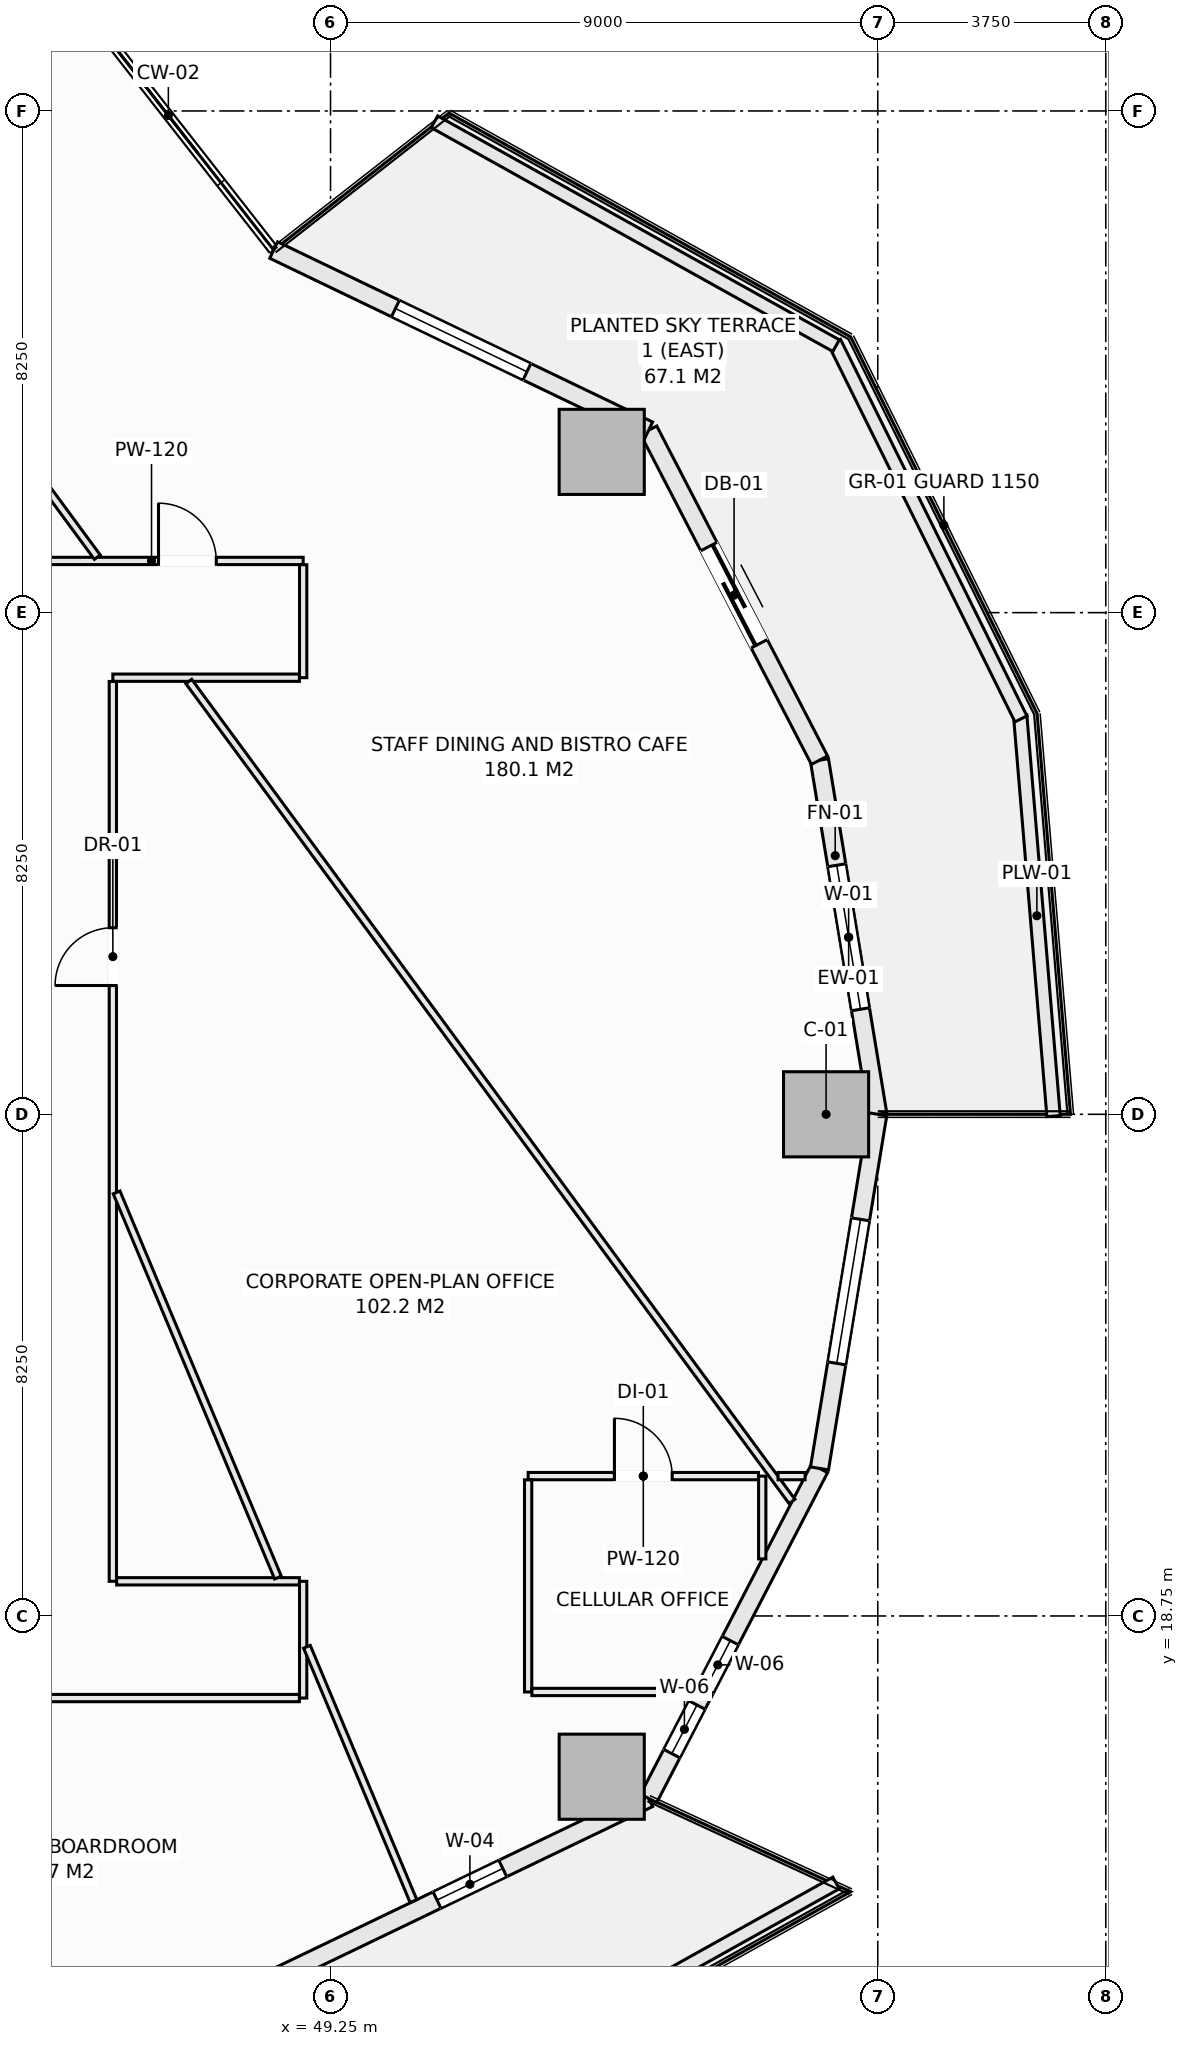
"""IFC4 building model, lengths in metres.
Left out: names, types, materials, properties, quantities, classifications, styles, units other than length and angle.
Written with IfcOpenShell. Run it as: python <this file> out.ifc"""

import sys

from ifc_helpers import new_model, si_unit, direction, frame, frame_2d, origin, origin_2d, place, context, subcontext, project, spatial, rectangle, extrude, element, fill, save


model = new_model("IFC4")
c1 = context("Model", 3, precision=1e-05, world=origin(), true_north=direction((0.0, 1.0)))
c2 = subcontext(c1, "Body", "Model", "MODEL_VIEW")
j1 = project(units=[si_unit("LENGTHUNIT", "METRE"), si_unit("PLANEANGLEUNIT", "RADIAN")], contexts=[c1])
p1 = place(None, origin())
s1 = spatial("IfcSite", under=j1, at=p1, CompositionType="ELEMENT")
p2 = place(p1, origin())
s2 = spatial("IfcBuilding", under=s1, at=p2, CompositionType="ELEMENT")
p3 = place(p2, frame((0.0, 0.0, 30.35)))
s3 = spatial("IfcBuildingStorey", under=s2, at=p3, CompositionType="ELEMENT", Elevation=30.35)
for number, where, z_axis, x_axis in (
    (1, (57.4, 27.0, -0.28), (0.0, 0.0, 1.0), (1.0, 0.0, 0.0)),
    (2, (53.71, 37.894, -0.28), (0.0, 0.0, 1.0), (1.0, 0.0, 0.0)),
    (3, (53.71, 16.106, -0.28), (0.0, 0.0, 1.0), (1.0, 0.0, 0.0)),
):
    element("IfcColumn", number, at=place(p3, frame(where, z_axis=z_axis, x_axis=x_axis)), inside=s3, PredefinedType="COLUMN", context=c2, shape_type="SweptSolid", body=[
        extrude(rectangle(XDim=1.4, YDim=1.4, at=origin_2d()), origin(), (0.0, 0.0, 1.0), 3.85),
    ])
p4 = place(p3, frame((57.292, 32.823, 0.0), z_axis=(0.0, 0.0, 1.0), x_axis=(0.162366057843, -0.98673059305, 0.0)))
e4 = element("IfcWall", 4, at=p4, inside=s3, PredefinedType="SOLIDWALL", context=c2, shape_type="SweptSolid", body=[
    extrude(rectangle(XDim=5.902, YDim=0.3, at=frame_2d((2.951, 0.0))), origin(), (0.0, 0.0, 1.0), 3.093),
])
p5 = place(p4, frame((1.751, 0.0, 0.85)))
e5 = element("IfcOpeningElement", 5, at=p5, cuts=e4, PredefinedType="OPENING", context=c2, shape_type="SweptSolid", body=[
    extrude(rectangle(XDim=2.4, YDim=1.9, at=frame_2d((1.2, 0.95))), frame((0.0, 0.16, 0.0), z_axis=(0.0, -1.0, 0.0), x_axis=(1.0, 0.0, 0.0)), (0.0, 0.0, 1.0), 0.32),
])
p6 = place(p3, frame((54.482, 38.25, 0.0), z_axis=(0.0, 0.0, 1.0), x_axis=(0.459809804413, -0.88801742312, 0.0)))
e6 = element("IfcWall", 6, at=p6, inside=s3, PredefinedType="SOLIDWALL", context=c2, shape_type="SweptSolid", body=[
    extrude(rectangle(XDim=6.111, YDim=0.3, at=frame_2d((3.055, 0.0))), origin(), (0.0, 0.0, 1.0), 3.093),
])
p7 = place(p6, frame((2.155, 0.0, 0.0)))
e7 = element("IfcOpeningElement", 7, at=p7, cuts=e6, PredefinedType="OPENING", context=c2, shape_type="SweptSolid", body=[
    extrude(rectangle(XDim=1.8, YDim=2.25, at=frame_2d((0.9, 1.125))), frame((0.0, 0.16, 0.0), z_axis=(0.0, -1.0, 0.0), x_axis=(1.0, 0.0, 0.0)), (0.0, 0.0, 1.0), 0.32),
])
p8 = place(p3, frame((48.315, 41.213, 0.0), z_axis=(0.0, 0.0, 1.0), x_axis=(0.901360393999, -0.433069786673, 0.0)))
e8 = element("IfcWall", 8, at=p8, inside=s3, PredefinedType="SOLIDWALL", context=c2, shape_type="SweptSolid", body=[
    extrude(rectangle(XDim=6.842, YDim=0.3, at=frame_2d((3.421, 0.0))), origin(), (0.0, 0.0, 1.0), 3.093),
])
p9 = place(p8, frame((2.221, 0.0, 0.85)))
e9 = element("IfcOpeningElement", 9, at=p9, cuts=e8, PredefinedType="OPENING", context=c2, shape_type="SweptSolid", body=[
    extrude(rectangle(XDim=2.4, YDim=1.9, at=frame_2d((1.2, 0.95))), frame((0.0, 0.16, 0.0), z_axis=(0.0, -1.0, 0.0), x_axis=(1.0, 0.0, 0.0)), (0.0, 0.0, 1.0), 0.32),
])
p10 = place(p3, frame((48.315, 12.787, 0.0), z_axis=(0.0, 0.0, 1.0), x_axis=(0.901360393999, 0.433069786673, 0.0)))
e10 = element("IfcWall", 10, at=p10, inside=s3, PredefinedType="SOLIDWALL", context=c2, shape_type="SweptSolid", body=[
    extrude(rectangle(XDim=6.842, YDim=0.3, at=frame_2d((3.421, 0.0))), origin(), (0.0, 0.0, 1.0), 3.093),
])
p11 = place(p10, frame((2.98, 0.0, 0.72)))
e11 = element("IfcOpeningElement", 11, at=p11, cuts=e10, PredefinedType="OPENING", context=c2, shape_type="SweptSolid", body=[
    extrude(rectangle(XDim=1.2, YDim=1.65, at=frame_2d((0.6, 0.825))), frame((0.0, 0.16, 0.0), z_axis=(0.0, -1.0, 0.0), x_axis=(1.0, 0.0, 0.0)), (0.0, 0.0, 1.0), 0.32),
])
p12 = place(p3, frame((54.482, 15.75, 0.0), z_axis=(0.0, 0.0, 1.0), x_axis=(0.459809804413, 0.88801742312, 0.0)))
e12 = element("IfcWall", 12, at=p12, inside=s3, PredefinedType="SOLIDWALL", context=c2, shape_type="SweptSolid", body=[
    extrude(rectangle(XDim=6.111, YDim=0.3, at=frame_2d((3.055, 0.0))), origin(), (0.0, 0.0, 1.0), 3.093),
])
p13 = place(p12, frame((0.829, 0.0, 0.85)))
e13 = element("IfcOpeningElement", 13, at=p13, cuts=e12, PredefinedType="OPENING", context=c2, shape_type="SweptSolid", body=[
    extrude(rectangle(XDim=0.9, YDim=1.9, at=frame_2d((0.45, 0.95))), frame((0.0, 0.16, 0.0), z_axis=(0.0, -1.0, 0.0), x_axis=(1.0, 0.0, 0.0)), (0.0, 0.0, 1.0), 0.32),
])
p14 = place(p12, frame((2.022, 0.0, 0.85)))
e14 = element("IfcOpeningElement", 14, at=p14, cuts=e12, PredefinedType="OPENING", context=c2, shape_type="SweptSolid", body=[
    extrude(rectangle(XDim=0.9, YDim=1.9, at=frame_2d((0.45, 0.95))), frame((0.0, 0.16, 0.0), z_axis=(0.0, -1.0, 0.0), x_axis=(1.0, 0.0, 0.0)), (0.0, 0.0, 1.0), 0.32),
])
p15 = place(p3, frame((57.292, 21.177, 0.0), z_axis=(0.0, 0.0, 1.0), x_axis=(0.162366057843, 0.98673059305, 0.0)))
e15 = element("IfcWall", 15, at=p15, inside=s3, PredefinedType="SOLIDWALL", context=c2, shape_type="SweptSolid", body=[
    extrude(rectangle(XDim=5.902, YDim=0.3, at=frame_2d((2.951, 0.0))), origin(), (0.0, 0.0, 1.0), 3.093),
])
p16 = place(p15, frame((1.751, 0.0, 0.85)))
e16 = element("IfcOpeningElement", 16, at=p16, cuts=e15, PredefinedType="OPENING", context=c2, shape_type="SweptSolid", body=[
    extrude(rectangle(XDim=2.4, YDim=1.9, at=frame_2d((1.2, 0.95))), frame((0.0, 0.16, 0.0), z_axis=(0.0, -1.0, 0.0), x_axis=(1.0, 0.0, 0.0)), (0.0, 0.0, 1.0), 0.32),
])
p17 = place(p3, frame((60.592, 33.561, 0.0), z_axis=(0.0, 0.0, 1.0), x_axis=(0.08310047353, -0.996541173911, 0.0)))
e17 = element("IfcWall", 17, at=p17, inside=s3, PredefinedType="PARAPET", context=c2, shape_type="SweptSolid", body=[
    extrude(rectangle(XDim=6.613, YDim=0.22, at=frame_2d((3.307, 0.0))), origin(), (0.0, 0.0, 1.0), 0.52),
])
p18 = place(p3, frame((57.539, 39.697, 0.0), z_axis=(0.0, 0.0, 1.0), x_axis=(0.443578479433, -0.8962355341, 0.0)))
e18 = element("IfcWall", 18, at=p18, inside=s3, PredefinedType="PARAPET", context=c2, shape_type="SweptSolid", body=[
    extrude(rectangle(XDim=6.911, YDim=0.22, at=frame_2d((3.456, 0.0))), origin(), (0.0, 0.0, 1.0), 0.52),
])
for number, where, z_axis, x_axis in (
    (19, (50.959, 43.322, 0.0), (0.0, 0.0, 1.0), (0.874, -0.487, 0.0)),
    (20, (50.959, 10.678, 0.0), (0.0, 0.0, 1.0), (0.874, 0.487, 0.0)),
):
    element("IfcWall", number, at=place(p3, frame(where, z_axis=z_axis, x_axis=x_axis)), inside=s3, PredefinedType="PARAPET", context=c2, shape_type="SweptSolid", body=[
        extrude(rectangle(XDim=7.562, YDim=0.22, at=frame_2d((3.781, 0.0))), origin(), (0.0, 0.0, 1.0), 0.52),
    ])
p19 = place(p3, frame((43.812, 36.1, 0.0), z_axis=(0.0, 0.0, 1.0), x_axis=(1.0, 0.0, 0.0)))
e21 = element("IfcWall", 21, at=p19, inside=s3, PredefinedType="PARTITIONING", context=c2, shape_type="SweptSolid", body=[
    extrude(rectangle(XDim=4.988, YDim=0.12, at=frame_2d((2.494, 0.0))), origin(), (0.0, 0.0, 1.0), 3.57),
])
p20 = place(p19, frame((2.609, 0.0, 0.0)))
e22 = element("IfcOpeningElement", 22, at=p20, cuts=e21, PredefinedType="OPENING", context=c2, shape_type="SweptSolid", body=[
    extrude(rectangle(XDim=0.95, YDim=2.1, at=frame_2d((0.475, 1.05))), frame((0.0, 0.07, 0.0), z_axis=(0.0, -1.0, 0.0), x_axis=(1.0, 0.0, 0.0)), (0.0, 0.0, 1.0), 0.14),
])
p21 = place(p3, frame((48.8, 17.4, 0.0), z_axis=(0.0, 0.0, 1.0), x_axis=(0.0, 1.0, 0.0)))
e23 = element("IfcWall", 23, at=p21, inside=s3, PredefinedType="PARTITIONING", context=c2, shape_type="SweptSolid", body=[
    extrude(rectangle(XDim=1.92, YDim=0.12, at=frame_2d((0.96, 0.0))), origin(), (0.0, 0.0, 1.0), 3.57),
])
p22 = place(p3, frame((48.8, 34.18, 0.0), z_axis=(0.0, 0.0, 1.0), x_axis=(0.0, 1.0, 0.0)))
e24 = element("IfcWall", 24, at=p22, inside=s3, PredefinedType="PARTITIONING", context=c2, shape_type="SweptSolid", body=[
    extrude(rectangle(XDim=1.858, YDim=0.12, at=frame_2d((0.929, 0.0))), origin(), (0.0, 0.0, 1.0), 3.57),
])
p23 = place(p3, frame((45.67, 34.18, 0.0), z_axis=(0.0, 0.0, 1.0), x_axis=(1.0, 0.0, 0.0)))
e25 = element("IfcWall", 25, at=p23, inside=s3, PredefinedType="PARTITIONING", context=c2, shape_type="SweptSolid", body=[
    extrude(rectangle(XDim=3.068, YDim=0.12, at=frame_2d((1.534, 0.0))), origin(), (0.0, 0.0, 1.0), 3.205),
])
p24 = place(p3, frame((45.67, 19.32, 0.0), z_axis=(0.0, 0.0, 1.0), x_axis=(0.0, 1.0, 0.0)))
e26 = element("IfcWall", 26, at=p24, inside=s3, PredefinedType="PARTITIONING", context=c2, shape_type="SweptSolid", body=[
    extrude(rectangle(XDim=14.798, YDim=0.12, at=frame_2d((7.399, 0.0))), origin(), (0.0, 0.0, 1.0), 3.57),
])
p25 = place(p24, frame((9.798, 0.0, 0.0)))
e27 = element("IfcOpeningElement", 27, at=p25, cuts=e26, PredefinedType="OPENING", context=c2, shape_type="SweptSolid", body=[
    extrude(rectangle(XDim=0.95, YDim=2.1, at=frame_2d((0.475, 1.05))), frame((0.0, 0.07, 0.0), z_axis=(0.0, -1.0, 0.0), x_axis=(1.0, 0.0, 0.0)), (0.0, 0.0, 1.0), 0.14),
])
p26 = place(p3, frame((45.732, 19.32, 0.0), z_axis=(0.0, 0.0, 1.0), x_axis=(1.0, 0.0, 0.0)))
e28 = element("IfcWall", 28, at=p26, inside=s3, PredefinedType="PARTITIONING", context=c2, shape_type="SweptSolid", body=[
    extrude(rectangle(XDim=3.006, YDim=0.12, at=frame_2d((1.503, 0.0))), origin(), (0.0, 0.0, 1.0), 3.205),
])
p27 = place(p3, frame((43.812, 17.4, 0.0), z_axis=(0.0, 0.0, 1.0), x_axis=(1.0, 0.0, 0.0)))
e29 = element("IfcWall", 29, at=p27, inside=s3, PredefinedType="PARTITIONING", context=c2, shape_type="SweptSolid", body=[
    extrude(rectangle(XDim=4.926, YDim=0.12, at=frame_2d((2.463, 0.0))), origin(), (0.0, 0.0, 1.0), 3.57),
])
p28 = place(p3, frame((37.006, 15.588, 0.0), z_axis=(0.0, 0.0, 1.0), x_axis=(0.925475521817, -0.378807416134, 0.0)))
e30 = element("IfcWall", 30, at=p28, inside=s3, PredefinedType="PARTITIONING", context=c2, shape_type="SweptSolid", body=[
    extrude(rectangle(XDim=10.891, YDim=0.12, at=frame_2d((5.445, 0.0))), origin(), (0.0, 0.0, 1.0), 2.934),
])
p29 = place(p3, frame((45.732, 25.716, 0.0), z_axis=(0.0, 0.0, 1.0), x_axis=(0.386366732024, -0.922345243597, 0.0)))
e31 = element("IfcWall", 31, at=p29, inside=s3, PredefinedType="PARTITIONING", context=c2, shape_type="SweptSolid", body=[
    extrude(rectangle(XDim=6.867, YDim=0.12, at=frame_2d((3.433, 0.0))), origin(), (0.0, 0.0, 1.0), 3.57),
])
p30 = place(p3, frame((48.862, 18.243, 0.0), z_axis=(0.0, 0.0, 1.0), x_axis=(0.386350060349, -0.922352227117, 0.0)))
e32 = element("IfcWall", 32, at=p30, inside=s3, PredefinedType="PARTITIONING", context=c2, shape_type="SweptSolid", body=[
    extrude(rectangle(XDim=4.535, YDim=0.12, at=frame_2d((2.268, 0.0))), origin(), (0.0, 0.0, 1.0), 3.57),
])
p31 = place(p3, frame((36.184, 48.709, 0.0), z_axis=(0.0, 0.0, 1.0), x_axis=(0.592622013748, -0.805480694257, 0.0)))
e33 = element("IfcWall", 33, at=p31, inside=s3, PredefinedType="PARTITIONING", context=c2, shape_type="SweptSolid", body=[
    extrude(rectangle(XDim=15.577, YDim=0.12, at=frame_2d((7.789, 0.0))), origin(), (0.0, 0.0, 1.0), 3.57),
])
p32 = place(p31, frame((1.008, 0.0, 0.0)))
e34 = element("IfcOpeningElement", 34, at=p32, cuts=e33, PredefinedType="OPENING", context=c2, shape_type="SweptSolid", body=[
    extrude(rectangle(XDim=0.95, YDim=2.1, at=frame_2d((0.475, 1.05))), frame((0.0, 0.07, 0.0), z_axis=(0.0, -1.0, 0.0), x_axis=(1.0, 0.0, 0.0)), (0.0, 0.0, 1.0), 0.14),
])
p33 = place(p3, frame((46.919, 34.118, 0.0), z_axis=(0.0, 0.0, 1.0), x_axis=(0.592610371872, -0.805489259487, 0.0)))
e35 = element("IfcWall", 35, at=p33, inside=s3, PredefinedType="PARTITIONING", context=c2, shape_type="SweptSolid", body=[
    extrude(rectangle(XDim=16.741, YDim=0.12, at=frame_2d((8.37, 0.0))), origin(), (0.0, 0.0, 1.0), 3.57),
])
p34 = place(p3, frame((56.35, 19.688, 0.0), z_axis=(0.0, 0.0, 1.0), x_axis=(0.0, 1.0, 0.0)))
e36 = element("IfcWall", 36, at=p34, inside=s3, PredefinedType="PARTITIONING", context=c2, shape_type="SweptSolid", body=[
    extrude(rectangle(XDim=1.362, YDim=0.12, at=frame_2d((0.681, 0.0))), origin(), (0.0, 0.0, 1.0), 3.57),
])
p35 = place(p3, frame((52.5, 21.05, 0.0), z_axis=(0.0, 0.0, 1.0), x_axis=(1.0, 0.0, 0.0)))
e37 = element("IfcWall", 37, at=p35, inside=s3, PredefinedType="PARTITIONING", context=c2, shape_type="SweptSolid", body=[
    extrude(rectangle(XDim=3.788, YDim=0.12, at=frame_2d((1.894, 0.0))), origin(), (0.0, 0.0, 1.0), 3.57),
])
p36 = place(p35, frame((1.419, 0.0, 0.0)))
e38 = element("IfcOpeningElement", 38, at=p36, cuts=e37, PredefinedType="OPENING", context=c2, shape_type="SweptSolid", body=[
    extrude(rectangle(XDim=0.95, YDim=2.1, at=frame_2d((0.475, 1.05))), frame((0.0, 0.07, 0.0), z_axis=(0.0, -1.0, 0.0), x_axis=(1.0, 0.0, 0.0)), (0.0, 0.0, 1.0), 0.14),
])
p37 = place(p3, frame((56.61, 21.05, 0.0), z_axis=(0.0, 0.0, 1.0), x_axis=(1.0, 0.0, 0.0)))
e39 = element("IfcWall", 39, at=p37, inside=s3, PredefinedType="PARTITIONING", context=c2, shape_type="SweptSolid", body=[
    extrude(rectangle(XDim=0.445, YDim=0.12, at=frame_2d((0.222, 0.0))), origin(), (0.0, 0.0, 1.0), 3.57),
])
p38 = place(p3, frame((52.5, 17.5, 0.0), z_axis=(0.0, 0.0, 1.0), x_axis=(0.0, 1.0, 0.0)))
e40 = element("IfcWall", 40, at=p38, inside=s3, PredefinedType="PARTITIONING", context=c2, shape_type="SweptSolid", body=[
    extrude(rectangle(XDim=3.488, YDim=0.12, at=frame_2d((1.744, 0.0))), origin(), (0.0, 0.0, 1.0), 3.57),
])
p39 = place(p3, frame((52.562, 17.5, 0.0), z_axis=(0.0, 0.0, 1.0), x_axis=(1.0, 0.0, 0.0)))
e41 = element("IfcWall", 41, at=p39, inside=s3, PredefinedType="PARTITIONING", context=c2, shape_type="SweptSolid", body=[
    extrude(rectangle(XDim=2.655, YDim=0.12, at=frame_2d((1.327, 0.0))), origin(), (0.0, 0.0, 1.0), 3.57),
])
p40 = place(p5, origin())
e42 = element("IfcWindow", 42, at=p40, inside=s3, PartitioningType="SINGLE_PANEL", PredefinedType="WINDOW", context=c2, shape_type="SweptSolid", body=[
    extrude(rectangle(XDim=2.4, YDim=1.9, at=frame_2d((1.2, 0.95))), frame((0.0, 0.03, 0.0), z_axis=(0.0, -1.0, 0.0), x_axis=(1.0, 0.0, 0.0)), (0.0, 0.0, 1.0), 0.06),
])
fill(e5, e42)
p41 = place(p7, origin())
e43 = element("IfcDoor", 43, at=p41, inside=s3, OperationType="SLIDING_TO_LEFT", PredefinedType="DOOR", context=c2, shape_type="SweptSolid", body=[
    extrude(rectangle(XDim=1.8, YDim=2.25, at=frame_2d((0.9, 1.125))), frame((0.0, 0.025, 0.0), z_axis=(0.0, -1.0, 0.0), x_axis=(1.0, 0.0, 0.0)), (0.0, 0.0, 1.0), 0.05),
])
fill(e7, e43)
p42 = place(p9, origin())
e44 = element("IfcWindow", 44, at=p42, inside=s3, PartitioningType="SINGLE_PANEL", PredefinedType="WINDOW", context=c2, shape_type="SweptSolid", body=[
    extrude(rectangle(XDim=2.4, YDim=1.9, at=frame_2d((1.2, 0.95))), frame((0.0, 0.03, 0.0), z_axis=(0.0, -1.0, 0.0), x_axis=(1.0, 0.0, 0.0)), (0.0, 0.0, 1.0), 0.06),
])
fill(e9, e44)
p43 = place(p11, origin())
e45 = element("IfcWindow", 45, at=p43, inside=s3, PartitioningType="SINGLE_PANEL", PredefinedType="WINDOW", context=c2, shape_type="SweptSolid", body=[
    extrude(rectangle(XDim=1.2, YDim=1.65, at=frame_2d((0.6, 0.825))), frame((0.0, 0.03, 0.0), z_axis=(0.0, -1.0, 0.0), x_axis=(1.0, 0.0, 0.0)), (0.0, 0.0, 1.0), 0.06),
])
fill(e11, e45)
p44 = place(p13, origin())
e46 = element("IfcWindow", 46, at=p44, inside=s3, PartitioningType="SINGLE_PANEL", PredefinedType="WINDOW", context=c2, shape_type="SweptSolid", body=[
    extrude(rectangle(XDim=0.9, YDim=1.9, at=frame_2d((0.45, 0.95))), frame((0.0, 0.03, 0.0), z_axis=(0.0, -1.0, 0.0), x_axis=(1.0, 0.0, 0.0)), (0.0, 0.0, 1.0), 0.06),
])
fill(e13, e46)
p45 = place(p16, origin())
e47 = element("IfcWindow", 47, at=p45, inside=s3, PartitioningType="SINGLE_PANEL", PredefinedType="WINDOW", context=c2, shape_type="SweptSolid", body=[
    extrude(rectangle(XDim=2.4, YDim=1.9, at=frame_2d((1.2, 0.95))), frame((0.0, 0.03, 0.0), z_axis=(0.0, -1.0, 0.0), x_axis=(1.0, 0.0, 0.0)), (0.0, 0.0, 1.0), 0.06),
])
fill(e16, e47)
p46 = place(p25, origin())
e48 = element("IfcDoor", 48, at=p46, inside=s3, OperationType="SINGLE_SWING_LEFT", PredefinedType="DOOR", context=c2, shape_type="SweptSolid", body=[
    extrude(rectangle(XDim=0.95, YDim=2.1, at=frame_2d((0.475, 1.05))), frame((0.0, 0.025, 0.0), z_axis=(0.0, -1.0, 0.0), x_axis=(1.0, 0.0, 0.0)), (0.0, 0.0, 1.0), 0.05),
])
fill(e27, e48)
p47 = place(p20, origin())
e49 = element("IfcDoor", 49, at=p47, inside=s3, OperationType="SINGLE_SWING_LEFT", PredefinedType="DOOR", context=c2, shape_type="SweptSolid", body=[
    extrude(rectangle(XDim=0.95, YDim=2.1, at=frame_2d((0.475, 1.05))), frame((0.0, 0.025, 0.0), z_axis=(0.0, -1.0, 0.0), x_axis=(1.0, 0.0, 0.0)), (0.0, 0.0, 1.0), 0.05),
])
fill(e22, e49)
p48 = place(p36, origin())
e50 = element("IfcDoor", 50, at=p48, inside=s3, OperationType="SINGLE_SWING_LEFT", PredefinedType="DOOR", context=c2, shape_type="SweptSolid", body=[
    extrude(rectangle(XDim=0.95, YDim=2.1, at=frame_2d((0.475, 1.05))), frame((0.0, 0.025, 0.0), z_axis=(0.0, -1.0, 0.0), x_axis=(1.0, 0.0, 0.0)), (0.0, 0.0, 1.0), 0.05),
])
fill(e38, e50)
p49 = place(p14, origin())
e51 = element("IfcWindow", 51, at=p49, inside=s3, PartitioningType="SINGLE_PANEL", PredefinedType="WINDOW", context=c2, shape_type="SweptSolid", body=[
    extrude(rectangle(XDim=0.9, YDim=1.9, at=frame_2d((0.45, 0.95))), frame((0.0, 0.03, 0.0), z_axis=(0.0, -1.0, 0.0), x_axis=(1.0, 0.0, 0.0)), (0.0, 0.0, 1.0), 0.06),
])
fill(e14, e51)
save(model, sys.argv[1])
